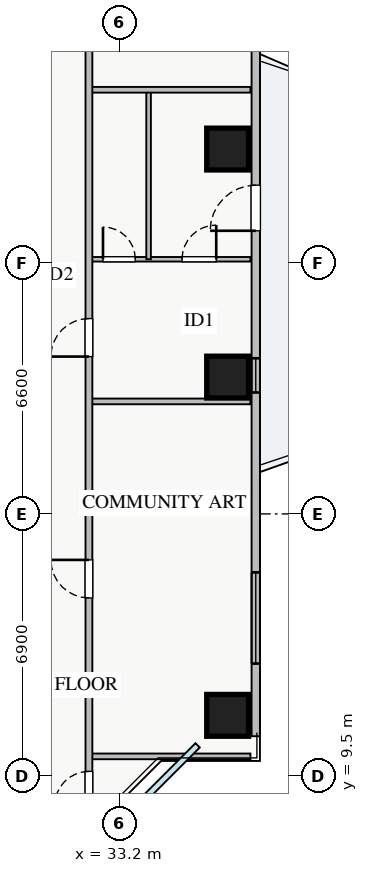
"""IFC4 building model, lengths in metres.
Left out: names, types, materials, properties, quantities, classifications, styles, units other than length and angle.
Written with IfcOpenShell. Run it as: python <this file> out.ifc"""

import sys

from ifc_helpers import new_model, si_unit, direction, frame, frame_2d, origin, origin_2d, place, context, subcontext, project, spatial, rectangle, extrude, source, transform, mapped, element, fill, save


model = new_model("IFC4")
c1 = context("Model", 3, precision=1e-05, world=origin(), true_north=direction((0.0, 1.0)))
c2 = subcontext(c1, "Body", "Model", "MODEL_VIEW")
j1 = project(units=[si_unit("LENGTHUNIT", "METRE"), si_unit("PLANEANGLEUNIT", "RADIAN")], contexts=[c1])
p1 = place(None, origin())
s1 = spatial("IfcSite", under=j1, at=p1, CompositionType="ELEMENT")
p2 = place(p1, origin())
s2 = spatial("IfcBuilding", under=s1, at=p2, CompositionType="ELEMENT")
p3 = place(p2, frame((0.0, 0.0, 100.25)))
s3 = spatial("IfcBuildingStorey", under=s2, at=p3, CompositionType="ELEMENT", Elevation=100.25)
m1 = source(origin(), c2, "Body", "SweptSolid", [
    extrude(rectangle(XDim=1.1, YDim=1.1, at=origin_2d()), origin(), (0.0, 0.0, 1.0), 3.25),
])
for number, where, z_axis, x_axis in (
    (1, (36.05, 11.1, 0.0), (0.0, 0.0, 1.0), (1.0, 0.0, 0.0)),
    (2, (36.05, 20.0, 0.0), (0.0, 0.0, 1.0), (1.0, 0.0, 0.0)),
    (3, (36.05, 26.0, 0.0), (0.0, 0.0, 1.0), (1.0, 0.0, 0.0)),
):
    element("IfcColumn", number, at=place(p3, frame(where, z_axis=z_axis, x_axis=x_axis)), inside=s3, PredefinedType="COLUMN", context=c2, shape_type="MappedRepresentation", body=[
        mapped(m1, transform((0.0, 0.0, 0.0), x_axis=(1.0, 0.0, 0.0), y_axis=(0.0, 1.0, 0.0), z_axis=(0.0, 0.0, 1.0), scale=1.0)),
    ])
p4 = place(p3, frame((36.79, 10.55, 0.0), z_axis=(0.0, 0.0, 1.0), x_axis=(0.0, 1.0, 0.0)))
e4 = element("IfcWall", 4, at=p4, inside=s3, PredefinedType="STANDARD", context=c2, shape_type="SweptSolid", body=[
    extrude(rectangle(XDim=24.9, YDim=0.22, at=frame_2d((12.45, 0.0))), origin(), (0.0, 0.0, 1.0), 2.61),
])
p5 = place(p4, frame((13.3, 0.0, 0.0)))
e5 = element("IfcOpeningElement", 5, at=p5, cuts=e4, PredefinedType="OPENING", context=c2, shape_type="SweptSolid", body=[
    extrude(rectangle(XDim=1.2, YDim=2.1, at=frame_2d((0.6, 1.05))), frame((0.0, 0.12, 0.0), z_axis=(0.0, -1.0, 0.0), x_axis=(1.0, 0.0, 0.0)), (0.0, 0.0, 1.0), 0.24),
])
p6 = place(p4, frame((1.912, 0.0, 0.9)))
e6 = element("IfcOpeningElement", 6, at=p6, cuts=e4, PredefinedType="OPENING", context=c2, shape_type="SweptSolid", body=[
    extrude(rectangle(XDim=2.4, YDim=1.48, at=frame_2d((1.2, 0.74))), frame((0.0, 0.12, 0.0), z_axis=(0.0, -1.0, 0.0), x_axis=(1.0, 0.0, 0.0)), (0.0, 0.0, 1.0), 0.24),
])
p7 = place(p4, frame((22.165, 0.0, 0.9)))
e7 = element("IfcOpeningElement", 7, at=p7, cuts=e4, PredefinedType="OPENING", context=c2, shape_type="SweptSolid", body=[
    extrude(rectangle(XDim=2.1, YDim=1.5, at=frame_2d((1.05, 0.75))), frame((0.0, 0.12, 0.0), z_axis=(0.0, -1.0, 0.0), x_axis=(1.0, 0.0, 0.0)), (0.0, 0.0, 1.0), 0.24),
])
p8 = place(p4, frame((18.093, 0.0, 0.9)))
e8 = element("IfcOpeningElement", 8, at=p8, cuts=e4, PredefinedType="OPENING", context=c2, shape_type="SweptSolid", body=[
    extrude(rectangle(XDim=2.4, YDim=1.5, at=frame_2d((1.2, 0.75))), frame((0.0, 0.12, 0.0), z_axis=(0.0, -1.0, 0.0), x_axis=(1.0, 0.0, 0.0)), (0.0, 0.0, 1.0), 0.24),
])
p9 = place(p4, frame((9.045, 0.0, 0.9)))
e9 = element("IfcOpeningElement", 9, at=p9, cuts=e4, PredefinedType="OPENING", context=c2, shape_type="SweptSolid", body=[
    extrude(rectangle(XDim=0.9, YDim=1.2, at=frame_2d((0.45, 0.6))), frame((0.0, 0.12, 0.0), z_axis=(0.0, -1.0, 0.0), x_axis=(1.0, 0.0, 0.0)), (0.0, 0.0, 1.0), 0.24),
])
p10 = place(p3, frame((32.4, 10.02, 0.0), z_axis=(0.0, 0.0, 1.0), x_axis=(1.0, 0.0, 0.0)))
e10 = element("IfcWall", 10, at=p10, inside=s3, PredefinedType="PARTITIONING", context=c2, shape_type="SweptSolid", body=[
    extrude(rectangle(XDim=4.25, YDim=0.15, at=frame_2d((2.125, 0.0))), origin(), (0.0, 0.0, 1.0), 3.07),
])
p11 = place(p3, frame((32.4, 23.1, 0.0), z_axis=(0.0, 0.0, 1.0), x_axis=(1.0, 0.0, 0.0)))
e11 = element("IfcWall", 11, at=p11, inside=s3, PredefinedType="PLUMBINGWALL", context=c2, shape_type="SweptSolid", body=[
    extrude(rectangle(XDim=4.25, YDim=0.12, at=frame_2d((2.125, 0.0))), origin(), (0.0, 0.0, 1.0), 3.07),
])
p12 = place(p11, frame((0.37, 0.0, 0.0)))
e12 = element("IfcOpeningElement", 12, at=p12, cuts=e11, PredefinedType="OPENING", context=c2, shape_type="SweptSolid", body=[
    extrude(rectangle(XDim=0.85, YDim=2.05, at=frame_2d((0.425, 1.025))), frame((0.0, 0.07, 0.0), z_axis=(0.0, -1.0, 0.0), x_axis=(1.0, 0.0, 0.0)), (0.0, 0.0, 1.0), 0.14),
])
p13 = place(p11, frame((2.45, 0.0, 0.0)))
e13 = element("IfcOpeningElement", 13, at=p13, cuts=e11, PredefinedType="OPENING", context=c2, shape_type="SweptSolid", body=[
    extrude(rectangle(XDim=0.9, YDim=2.05, at=frame_2d((0.45, 1.025))), frame((0.0, 0.07, 0.0), z_axis=(0.0, -1.0, 0.0), x_axis=(1.0, 0.0, 0.0)), (0.0, 0.0, 1.0), 0.14),
])
p14 = place(p3, frame((33.97, 23.1, 0.0), z_axis=(0.0, 0.0, 1.0), x_axis=(0.0, 1.0, 0.0)))
e14 = element("IfcWall", 14, at=p14, inside=s3, PredefinedType="PLUMBINGWALL", context=c2, shape_type="SweptSolid", body=[
    extrude(rectangle(XDim=4.46, YDim=0.12, at=frame_2d((2.23, 0.0))), origin(), (0.0, 0.0, 1.0), 3.07),
])
for number, where, z_axis, x_axis in (
    (15, (32.4, 19.36, 0.0), (0.0, 0.0, 1.0), (1.0, 0.0, 0.0)),
    (16, (32.4, 27.56, 0.0), (0.0, 0.0, 1.0), (1.0, 0.0, 0.0)),
):
    element("IfcWall", number, at=place(p3, frame(where, z_axis=z_axis, x_axis=x_axis)), inside=s3, PredefinedType="PARTITIONING", context=c2, shape_type="SweptSolid", body=[
        extrude(rectangle(XDim=4.25, YDim=0.15, at=frame_2d((2.125, 0.0))), origin(), (0.0, 0.0, 1.0), 3.07),
    ])
p15 = place(p3, frame((32.4, 8.31, 0.0), z_axis=(0.0, 0.0, 1.0), x_axis=(0.0, 1.0, 0.0)))
e17 = element("IfcWall", 17, at=p15, inside=s3, PredefinedType="PARTITIONING", context=c2, shape_type="SweptSolid", body=[
    extrude(rectangle(XDim=29.13, YDim=0.18, at=frame_2d((14.565, 0.0))), origin(), (0.0, 0.0, 1.0), 3.07),
])
p16 = place(p15, frame((27.94, 0.0, 0.0)))
e18 = element("IfcOpeningElement", 18, at=p16, cuts=e17, PredefinedType="OPENING", context=c2, shape_type="SweptSolid", body=[
    extrude(rectangle(XDim=0.9, YDim=2.05, at=frame_2d((0.45, 1.025))), frame((0.0, 0.1, 0.0), z_axis=(0.0, -1.0, 0.0), x_axis=(1.0, 0.0, 0.0)), (0.0, 0.0, 1.0), 0.2),
])
p17 = place(p15, frame((0.415, 0.0, 0.0)))
e19 = element("IfcOpeningElement", 19, at=p17, cuts=e17, PredefinedType="OPENING", context=c2, shape_type="SweptSolid", body=[
    extrude(rectangle(XDim=0.9, YDim=2.05, at=frame_2d((0.45, 1.025))), frame((0.0, 0.1, 0.0), z_axis=(0.0, -1.0, 0.0), x_axis=(1.0, 0.0, 0.0)), (0.0, 0.0, 1.0), 0.2),
])
p18 = place(p15, frame((5.88, 0.0, 0.0)))
e20 = element("IfcOpeningElement", 20, at=p18, cuts=e17, PredefinedType="OPENING", context=c2, shape_type="SweptSolid", body=[
    extrude(rectangle(XDim=1.0, YDim=2.05, at=frame_2d((0.5, 1.025))), frame((0.0, 0.1, 0.0), z_axis=(0.0, -1.0, 0.0), x_axis=(1.0, 0.0, 0.0)), (0.0, 0.0, 1.0), 0.2),
])
p19 = place(p15, frame((12.23, 0.0, 0.0)))
e21 = element("IfcOpeningElement", 21, at=p19, cuts=e17, PredefinedType="OPENING", context=c2, shape_type="SweptSolid", body=[
    extrude(rectangle(XDim=1.0, YDim=2.05, at=frame_2d((0.5, 1.025))), frame((0.0, 0.1, 0.0), z_axis=(0.0, -1.0, 0.0), x_axis=(1.0, 0.0, 0.0)), (0.0, 0.0, 1.0), 0.2),
])
p20 = place(p15, frame((20.835, 0.0, 0.0)))
e22 = element("IfcOpeningElement", 22, at=p20, cuts=e17, PredefinedType="OPENING", context=c2, shape_type="SweptSolid", body=[
    extrude(rectangle(XDim=1.0, YDim=2.05, at=frame_2d((0.5, 1.025))), frame((0.0, 0.1, 0.0), z_axis=(0.0, -1.0, 0.0), x_axis=(1.0, 0.0, 0.0)), (0.0, 0.0, 1.0), 0.2),
])
m2 = source(origin(), c2, "Body", "SweptSolid", [
    extrude(rectangle(XDim=1.2, YDim=2.1, at=frame_2d((0.6, 1.05))), frame((0.0, 0.025, 0.0), z_axis=(0.0, -1.0, 0.0), x_axis=(1.0, 0.0, 0.0)), (0.0, 0.0, 1.0), 0.05),
])
p21 = place(p5, origin())
e23 = element("IfcDoor", 23, at=p21, inside=s3, OperationType="SINGLE_SWING_LEFT", PredefinedType="DOOR", context=c2, shape_type="MappedRepresentation", body=[
    mapped(m2, transform((0.0, 0.0, 0.0), x_axis=(1.0, 0.0, 0.0), y_axis=(0.0, 1.0, 0.0), z_axis=(0.0, 0.0, 1.0), scale=1.0)),
])
fill(e5, e23)
m3 = source(origin(), c2, "Body", "SweptSolid", [
    extrude(rectangle(XDim=2.4, YDim=1.48, at=frame_2d((1.2, 0.74))), frame((0.0, 0.03, 0.0), z_axis=(0.0, -1.0, 0.0), x_axis=(1.0, 0.0, 0.0)), (0.0, 0.0, 1.0), 0.06),
])
p22 = place(p6, origin())
e24 = element("IfcWindow", 24, at=p22, inside=s3, PartitioningType="TRIPLE_PANEL_VERTICAL", PredefinedType="WINDOW", context=c2, shape_type="MappedRepresentation", body=[
    mapped(m3, transform((0.0, 0.0, 0.0), x_axis=(1.0, 0.0, 0.0), y_axis=(0.0, 1.0, 0.0), z_axis=(0.0, 0.0, 1.0), scale=1.0)),
])
fill(e6, e24)
m4 = source(origin(), c2, "Body", "SweptSolid", [
    extrude(rectangle(XDim=0.85, YDim=2.05, at=frame_2d((0.425, 1.025))), frame((0.0, 0.025, 0.0), z_axis=(0.0, -1.0, 0.0), x_axis=(1.0, 0.0, 0.0)), (0.0, 0.0, 1.0), 0.05),
])
p23 = place(p12, origin())
e25 = element("IfcDoor", 25, at=p23, inside=s3, OperationType="SINGLE_SWING_LEFT", PredefinedType="DOOR", context=c2, shape_type="MappedRepresentation", body=[
    mapped(m4, transform((0.0, 0.0, 0.0), x_axis=(1.0, 0.0, 0.0), y_axis=(0.0, 1.0, 0.0), z_axis=(0.0, 0.0, 1.0), scale=1.0)),
])
fill(e12, e25)
m5 = source(origin(), c2, "Body", "SweptSolid", [
    extrude(rectangle(XDim=0.9, YDim=2.05, at=frame_2d((0.45, 1.025))), frame((0.0, 0.025, 0.0), z_axis=(0.0, -1.0, 0.0), x_axis=(1.0, 0.0, 0.0)), (0.0, 0.0, 1.0), 0.05),
])
p24 = place(p13, origin())
e26 = element("IfcDoor", 26, at=p24, inside=s3, OperationType="SINGLE_SWING_RIGHT", PredefinedType="DOOR", context=c2, shape_type="MappedRepresentation", body=[
    mapped(m5, transform((0.0, 0.0, 0.0), x_axis=(1.0, 0.0, 0.0), y_axis=(0.0, 1.0, 0.0), z_axis=(0.0, 0.0, 1.0), scale=1.0)),
])
fill(e13, e26)
p25 = place(p17, origin())
e27 = element("IfcDoor", 27, at=p25, inside=s3, OperationType="SINGLE_SWING_LEFT", PredefinedType="DOOR", context=c2, shape_type="MappedRepresentation", body=[
    mapped(m5, transform((0.0, 0.0, 0.0), x_axis=(1.0, 0.0, 0.0), y_axis=(0.0, 1.0, 0.0), z_axis=(0.0, 0.0, 1.0), scale=1.0)),
])
fill(e19, e27)
m6 = source(origin(), c2, "Body", "SweptSolid", [
    extrude(rectangle(XDim=1.0, YDim=2.05, at=frame_2d((0.5, 1.025))), frame((0.0, 0.025, 0.0), z_axis=(0.0, -1.0, 0.0), x_axis=(1.0, 0.0, 0.0)), (0.0, 0.0, 1.0), 0.05),
])
p26 = place(p18, origin())
e28 = element("IfcDoor", 28, at=p26, inside=s3, OperationType="SINGLE_SWING_RIGHT", PredefinedType="DOOR", context=c2, shape_type="MappedRepresentation", body=[
    mapped(m6, transform((0.0, 0.0, 0.0), x_axis=(1.0, 0.0, 0.0), y_axis=(0.0, 1.0, 0.0), z_axis=(0.0, 0.0, 1.0), scale=1.0)),
])
fill(e20, e28)
p27 = place(p19, origin())
e29 = element("IfcDoor", 29, at=p27, inside=s3, OperationType="SINGLE_SWING_LEFT", PredefinedType="DOOR", context=c2, shape_type="MappedRepresentation", body=[
    mapped(m6, transform((0.0, 0.0, 0.0), x_axis=(1.0, 0.0, 0.0), y_axis=(0.0, 1.0, 0.0), z_axis=(0.0, 0.0, 1.0), scale=1.0)),
])
fill(e21, e29)
m7 = source(origin(), c2, "Body", "SweptSolid", [
    extrude(rectangle(XDim=0.9, YDim=1.2, at=frame_2d((0.45, 0.6))), frame((0.0, 0.03, 0.0), z_axis=(0.0, -1.0, 0.0), x_axis=(1.0, 0.0, 0.0)), (0.0, 0.0, 1.0), 0.06),
])
p28 = place(p9, origin())
e30 = element("IfcWindow", 30, at=p28, inside=s3, PartitioningType="SINGLE_PANEL", PredefinedType="WINDOW", context=c2, shape_type="MappedRepresentation", body=[
    mapped(m7, transform((0.0, 0.0, 0.0), x_axis=(1.0, 0.0, 0.0), y_axis=(0.0, 1.0, 0.0), z_axis=(0.0, 0.0, 1.0), scale=1.0)),
])
fill(e9, e30)
save(model, sys.argv[1])
